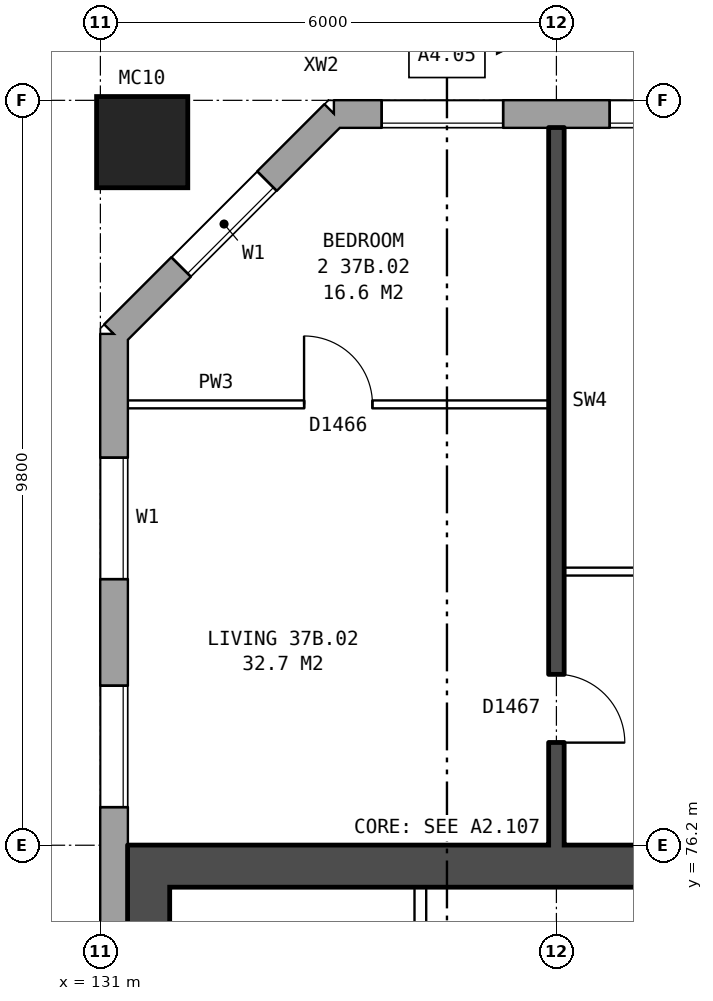
"""IFC4 building model, lengths in metres.
Left out: names, types, materials, properties, quantities, classifications, styles, units other than length and angle.
Written with IfcOpenShell. Run it as: python <this file> out.ifc"""

import sys

from ifc_helpers import new_model, si_unit, direction, frame, frame_2d, origin, origin_2d, place, context, subcontext, project, spatial, rectangle, hollow_rectangle, extrude, element, fill, save


model = new_model("IFC4")
c1 = context("Model", 3, precision=1e-05, world=origin(), true_north=direction((0.0, 1.0)))
c2 = subcontext(c1, "Body", "Model", "MODEL_VIEW")
j1 = project(units=[si_unit("LENGTHUNIT", "METRE"), si_unit("PLANEANGLEUNIT", "RADIAN")], contexts=[c1])
p1 = place(None, origin())
s1 = spatial("IfcSite", under=j1, at=p1, CompositionType="ELEMENT")
p2 = place(p1, origin())
s2 = spatial("IfcBuilding", under=s1, at=p2, CompositionType="ELEMENT")
p3 = place(p2, frame((0.0, 0.0, 133.0)))
s3 = spatial("IfcBuildingStorey", under=s2, at=p3, CompositionType="ELEMENT", Elevation=133.0)
p4 = place(p3, frame((131.55, 85.45, 0.0), z_axis=(0.0, 0.0, 1.0), x_axis=(1.0, 0.0, 0.0)))
e1 = element("IfcColumn", 1, at=p4, inside=s3, PredefinedType="COLUMN", context=c2, shape_type="SweptSolid", body=[
    extrude(hollow_rectangle(XDim=1.2, YDim=1.2, WallThickness=0.065, at=origin_2d()), origin(), (0.0, 0.0, 1.0), 3.1),
])
p5 = place(p3, frame((169.675, 85.82, 0.0), z_axis=(0.0, 0.0, 1.0), x_axis=(-1.0, 0.0, 0.0)))
e2 = element("IfcWall", 2, at=p5, inside=s3, PredefinedType="STANDARD", context=c2, shape_type="SweptSolid", body=[
    extrude(rectangle(XDim=35.601, YDim=0.36, at=frame_2d((17.8, 0.0))), origin(), (0.0, 0.0, 1.0), 2.85),
])
p6 = place(p5, frame((0.375, 0.0, 0.8)))
e3 = element("IfcOpeningElement", 3, at=p6, cuts=e2, PredefinedType="OPENING", context=c2, shape_type="SweptSolid", body=[
    extrude(rectangle(XDim=1.6, YDim=1.8, at=frame_2d((0.8, 0.9))), frame((0.0, 0.19, 0.0), z_axis=(0.0, -1.0, 0.0), x_axis=(1.0, 0.0, 0.0)), (0.0, 0.0, 1.0), 0.38),
])
p7 = place(p5, frame((3.375, 0.0, 0.8)))
e4 = element("IfcOpeningElement", 4, at=p7, cuts=e2, PredefinedType="OPENING", context=c2, shape_type="SweptSolid", body=[
    extrude(rectangle(XDim=1.6, YDim=1.8, at=frame_2d((0.8, 0.9))), frame((0.0, 0.19, 0.0), z_axis=(0.0, -1.0, 0.0), x_axis=(1.0, 0.0, 0.0)), (0.0, 0.0, 1.0), 0.38),
])
p8 = place(p5, frame((6.375, 0.0, 0.8)))
e5 = element("IfcOpeningElement", 5, at=p8, cuts=e2, PredefinedType="OPENING", context=c2, shape_type="SweptSolid", body=[
    extrude(rectangle(XDim=1.6, YDim=1.8, at=frame_2d((0.8, 0.9))), frame((0.0, 0.19, 0.0), z_axis=(0.0, -1.0, 0.0), x_axis=(1.0, 0.0, 0.0)), (0.0, 0.0, 1.0), 0.38),
])
p9 = place(p5, frame((8.875, 0.0, 0.8)))
e6 = element("IfcOpeningElement", 6, at=p9, cuts=e2, PredefinedType="OPENING", context=c2, shape_type="SweptSolid", body=[
    extrude(rectangle(XDim=0.8, YDim=1.8, at=frame_2d((0.4, 0.9))), frame((0.0, 0.19, 0.0), z_axis=(0.0, -1.0, 0.0), x_axis=(1.0, 0.0, 0.0)), (0.0, 0.0, 1.0), 0.38),
])
p10 = place(p5, frame((12.375, 0.0, 0.8)))
e7 = element("IfcOpeningElement", 7, at=p10, cuts=e2, PredefinedType="OPENING", context=c2, shape_type="SweptSolid", body=[
    extrude(rectangle(XDim=1.6, YDim=1.8, at=frame_2d((0.8, 0.9))), frame((0.0, 0.19, 0.0), z_axis=(0.0, -1.0, 0.0), x_axis=(1.0, 0.0, 0.0)), (0.0, 0.0, 1.0), 0.38),
])
p11 = place(p5, frame((15.375, 0.0, 0.8)))
e8 = element("IfcOpeningElement", 8, at=p11, cuts=e2, PredefinedType="OPENING", context=c2, shape_type="SweptSolid", body=[
    extrude(rectangle(XDim=1.6, YDim=1.8, at=frame_2d((0.8, 0.9))), frame((0.0, 0.19, 0.0), z_axis=(0.0, -1.0, 0.0), x_axis=(1.0, 0.0, 0.0)), (0.0, 0.0, 1.0), 0.38),
])
p12 = place(p5, frame((18.375, 0.0, 0.8)))
e9 = element("IfcOpeningElement", 9, at=p12, cuts=e2, PredefinedType="OPENING", context=c2, shape_type="SweptSolid", body=[
    extrude(rectangle(XDim=1.6, YDim=1.8, at=frame_2d((0.8, 0.9))), frame((0.0, 0.19, 0.0), z_axis=(0.0, -1.0, 0.0), x_axis=(1.0, 0.0, 0.0)), (0.0, 0.0, 1.0), 0.38),
])
p13 = place(p5, frame((21.375, 0.0, 0.8)))
e10 = element("IfcOpeningElement", 10, at=p13, cuts=e2, PredefinedType="OPENING", context=c2, shape_type="SweptSolid", body=[
    extrude(rectangle(XDim=1.6, YDim=1.8, at=frame_2d((0.8, 0.9))), frame((0.0, 0.19, 0.0), z_axis=(0.0, -1.0, 0.0), x_axis=(1.0, 0.0, 0.0)), (0.0, 0.0, 1.0), 0.38),
])
p14 = place(p5, frame((23.825, 0.0, 0.15)))
e11 = element("IfcOpeningElement", 11, at=p14, cuts=e2, PredefinedType="OPENING", context=c2, shape_type="SweptSolid", body=[
    extrude(rectangle(XDim=0.6, YDim=0.9, at=frame_2d((0.3, 0.45))), frame((0.0, 0.19, 0.0), z_axis=(0.0, -1.0, 0.0), x_axis=(1.0, 0.0, 0.0)), (0.0, 0.0, 1.0), 0.38),
])
p15 = place(p5, frame((27.375, 0.0, 0.8)))
e12 = element("IfcOpeningElement", 12, at=p15, cuts=e2, PredefinedType="OPENING", context=c2, shape_type="SweptSolid", body=[
    extrude(rectangle(XDim=1.6, YDim=1.8, at=frame_2d((0.8, 0.9))), frame((0.0, 0.19, 0.0), z_axis=(0.0, -1.0, 0.0), x_axis=(1.0, 0.0, 0.0)), (0.0, 0.0, 1.0), 0.38),
])
p16 = place(p5, frame((30.375, 0.0, 0.8)))
e13 = element("IfcOpeningElement", 13, at=p16, cuts=e2, PredefinedType="OPENING", context=c2, shape_type="SweptSolid", body=[
    extrude(rectangle(XDim=1.6, YDim=1.8, at=frame_2d((0.8, 0.9))), frame((0.0, 0.19, 0.0), z_axis=(0.0, -1.0, 0.0), x_axis=(1.0, 0.0, 0.0)), (0.0, 0.0, 1.0), 0.38),
])
p17 = place(p5, frame((33.375, 0.0, 0.8)))
e14 = element("IfcOpeningElement", 14, at=p17, cuts=e2, PredefinedType="OPENING", context=c2, shape_type="SweptSolid", body=[
    extrude(rectangle(XDim=1.6, YDim=1.8, at=frame_2d((0.8, 0.9))), frame((0.0, 0.19, 0.0), z_axis=(0.0, -1.0, 0.0), x_axis=(1.0, 0.0, 0.0)), (0.0, 0.0, 1.0), 0.38),
])
p18 = place(p5, frame((9.975, 0.0, 1.7)))
e15 = element("IfcOpeningElement", 15, at=p18, cuts=e2, PredefinedType="OPENING", context=c2, shape_type="SweptSolid", body=[
    extrude(rectangle(XDim=0.6, YDim=0.9, at=frame_2d((0.3, 0.45))), frame((0.0, 0.19, 0.0), z_axis=(0.0, -1.0, 0.0), x_axis=(1.0, 0.0, 0.0)), (0.0, 0.0, 1.0), 0.38),
])
p19 = place(p5, frame((25.275, 0.0, 1.35)))
e16 = element("IfcOpeningElement", 16, at=p19, cuts=e2, PredefinedType="OPENING", context=c2, shape_type="SweptSolid", body=[
    extrude(rectangle(XDim=1.2, YDim=1.2, at=frame_2d((0.6, 0.6))), frame((0.0, 0.19, 0.0), z_axis=(0.0, -1.0, 0.0), x_axis=(1.0, 0.0, 0.0)), (0.0, 0.0, 1.0), 0.38),
])
p20 = place(p3, frame((134.075, 85.82, 0.0), z_axis=(0.0, 0.0, 1.0), x_axis=(-0.707106781187, -0.707106781187, 0.0)))
e17 = element("IfcWall", 17, at=p20, inside=s3, PredefinedType="STANDARD", context=c2, shape_type="SweptSolid", body=[
    extrude(rectangle(XDim=4.094, YDim=0.36, at=frame_2d((2.047, 0.0))), origin(), (0.0, 0.0, 1.0), 2.85),
])
p21 = place(p20, frame((1.247, 0.0, 0.8)))
e18 = element("IfcOpeningElement", 18, at=p21, cuts=e17, PredefinedType="OPENING", context=c2, shape_type="SweptSolid", body=[
    extrude(rectangle(XDim=1.6, YDim=1.8, at=frame_2d((0.8, 0.9))), frame((0.0, 0.19, 0.0), z_axis=(0.0, -1.0, 0.0), x_axis=(1.0, 0.0, 0.0)), (0.0, 0.0, 1.0), 0.38),
])
p22 = place(p3, frame((131.18, 82.925, 0.0), z_axis=(0.0, 0.0, 1.0), x_axis=(0.0, -1.0, 0.0)))
e19 = element("IfcWall", 19, at=p22, inside=s3, PredefinedType="STANDARD", context=c2, shape_type="SweptSolid", body=[
    extrude(rectangle(XDim=25.851, YDim=0.36, at=frame_2d((12.925, 0.0))), origin(), (0.0, 0.0, 1.0), 2.85),
])
p23 = place(p22, frame((1.625, 0.0, 0.8)))
e20 = element("IfcOpeningElement", 20, at=p23, cuts=e19, PredefinedType="OPENING", context=c2, shape_type="SweptSolid", body=[
    extrude(rectangle(XDim=1.6, YDim=1.8, at=frame_2d((0.8, 0.9))), frame((0.0, 0.19, 0.0), z_axis=(0.0, -1.0, 0.0), x_axis=(1.0, 0.0, 0.0)), (0.0, 0.0, 1.0), 0.38),
])
p24 = place(p22, frame((4.625, 0.0, 0.8)))
e21 = element("IfcOpeningElement", 21, at=p24, cuts=e19, PredefinedType="OPENING", context=c2, shape_type="SweptSolid", body=[
    extrude(rectangle(XDim=1.6, YDim=1.8, at=frame_2d((0.8, 0.9))), frame((0.0, 0.19, 0.0), z_axis=(0.0, -1.0, 0.0), x_axis=(1.0, 0.0, 0.0)), (0.0, 0.0, 1.0), 0.38),
])
p25 = place(p22, frame((19.625, 0.0, 0.8)))
e22 = element("IfcOpeningElement", 22, at=p25, cuts=e19, PredefinedType="OPENING", context=c2, shape_type="SweptSolid", body=[
    extrude(rectangle(XDim=1.6, YDim=1.8, at=frame_2d((0.8, 0.9))), frame((0.0, 0.19, 0.0), z_axis=(0.0, -1.0, 0.0), x_axis=(1.0, 0.0, 0.0)), (0.0, 0.0, 1.0), 0.38),
])
p26 = place(p22, frame((22.625, 0.0, 0.8)))
e23 = element("IfcOpeningElement", 23, at=p26, cuts=e19, PredefinedType="OPENING", context=c2, shape_type="SweptSolid", body=[
    extrude(rectangle(XDim=1.6, YDim=1.8, at=frame_2d((0.8, 0.9))), frame((0.0, 0.19, 0.0), z_axis=(0.0, -1.0, 0.0), x_axis=(1.0, 0.0, 0.0)), (0.0, 0.0, 1.0), 0.38),
])
p27 = place(p3, frame((131.635, 63.8, 0.0), z_axis=(0.0, 0.0, 1.0), x_axis=(0.0, 1.0, 0.0)))
e24 = element("IfcWall", 24, at=p27, inside=s3, PredefinedType="SHEAR", context=c2, shape_type="SweptSolid", body=[
    extrude(rectangle(XDim=12.4, YDim=0.55, at=frame_2d((6.2, 0.0))), origin(), (0.0, 0.0, 1.0), 2.85),
])
p28 = place(p3, frame((139.21, 75.925, 0.0), z_axis=(0.0, 0.0, 1.0), x_axis=(-1.0, 0.0, 0.0)))
e25 = element("IfcWall", 25, at=p28, inside=s3, PredefinedType="SHEAR", context=c2, shape_type="SweptSolid", body=[
    extrude(rectangle(XDim=7.3, YDim=0.55, at=frame_2d((3.65, 0.0))), origin(), (0.0, 0.0, 1.0), 2.85),
])
p29 = place(p3, frame((135.21, 71.375, 0.0), z_axis=(0.0, 0.0, 1.0), x_axis=(0.0, 1.0, 0.0)))
e26 = element("IfcWall", 26, at=p29, inside=s3, PredefinedType="PARTITIONING", context=c2, shape_type="SweptSolid", body=[
    extrude(rectangle(XDim=4.275, YDim=0.15, at=frame_2d((2.137, 0.0))), origin(), (0.0, 0.0, 1.0), 2.85),
])
p30 = place(p29, frame((2.625, 0.0, 0.0)))
e27 = element("IfcOpeningElement", 27, at=p30, cuts=e26, PredefinedType="OPENING", context=c2, shape_type="SweptSolid", body=[
    extrude(rectangle(XDim=1.1, YDim=2.1, at=frame_2d((0.55, 1.05))), frame((0.0, 0.085, 0.0), z_axis=(0.0, -1.0, 0.0), x_axis=(1.0, 0.0, 0.0)), (0.0, 0.0, 1.0), 0.17),
])
p31 = place(p3, frame((137.1, 79.8, 0.0), z_axis=(0.0, 0.0, 1.0), x_axis=(1.0, 0.0, 0.0)))
e28 = element("IfcWall", 28, at=p31, inside=s3, PredefinedType="PARTITIONING", context=c2, shape_type="SweptSolid", body=[
    extrude(rectangle(XDim=5.8, YDim=0.1, at=frame_2d((2.9, 0.0))), origin(), (0.0, 0.0, 1.0), 2.85),
])
p32 = place(p31, frame((1.3, 0.0, 0.0)))
e29 = element("IfcOpeningElement", 29, at=p32, cuts=e28, PredefinedType="OPENING", context=c2, shape_type="SweptSolid", body=[
    extrude(rectangle(XDim=0.9, YDim=2.1, at=frame_2d((0.45, 1.05))), frame((0.0, 0.06, 0.0), z_axis=(0.0, -1.0, 0.0), x_axis=(1.0, 0.0, 0.0)), (0.0, 0.0, 1.0), 0.12),
])
p33 = place(p31, frame((4.2, 0.0, 0.0)))
e30 = element("IfcOpeningElement", 30, at=p33, cuts=e28, PredefinedType="OPENING", context=c2, shape_type="SweptSolid", body=[
    extrude(rectangle(XDim=0.9, YDim=2.1, at=frame_2d((0.45, 1.05))), frame((0.0, 0.06, 0.0), z_axis=(0.0, -1.0, 0.0), x_axis=(1.0, 0.0, 0.0)), (0.0, 0.0, 1.0), 0.12),
])
p34 = place(p3, frame((131.36, 82.0, 0.0), z_axis=(0.0, 0.0, 1.0), x_axis=(1.0, 0.0, 0.0)))
e31 = element("IfcWall", 31, at=p34, inside=s3, PredefinedType="PARTITIONING", context=c2, shape_type="SweptSolid", body=[
    extrude(rectangle(XDim=5.54, YDim=0.1, at=frame_2d((2.77, 0.0))), origin(), (0.0, 0.0, 1.0), 2.85),
])
p35 = place(p34, frame((2.32, 0.0, 0.0)))
e32 = element("IfcOpeningElement", 32, at=p35, cuts=e31, PredefinedType="OPENING", context=c2, shape_type="SweptSolid", body=[
    extrude(rectangle(XDim=0.9, YDim=2.1, at=frame_2d((0.45, 1.05))), frame((0.0, 0.06, 0.0), z_axis=(0.0, -1.0, 0.0), x_axis=(1.0, 0.0, 0.0)), (0.0, 0.0, 1.0), 0.12),
])
p36 = place(p3, frame((137.0, 76.2, 0.0), z_axis=(0.0, 0.0, 1.0), x_axis=(0.0, 1.0, 0.0)))
e33 = element("IfcWall", 33, at=p36, inside=s3, PredefinedType="SOLIDWALL", context=c2, shape_type="SweptSolid", body=[
    extrude(rectangle(XDim=9.44, YDim=0.2, at=frame_2d((4.72, 0.0))), origin(), (0.0, 0.0, 1.0), 2.85),
])
p37 = place(p36, frame((1.35, 0.0, 0.0)))
e34 = element("IfcOpeningElement", 34, at=p37, cuts=e33, PredefinedType="OPENING", context=c2, shape_type="SweptSolid", body=[
    extrude(rectangle(XDim=0.9, YDim=2.1, at=frame_2d((0.45, 1.05))), frame((0.0, 0.11, 0.0), z_axis=(0.0, -1.0, 0.0), x_axis=(1.0, 0.0, 0.0)), (0.0, 0.0, 1.0), 0.22),
])
p38 = place(p16, origin())
e35 = element("IfcWindow", 35, at=p38, inside=s3, PartitioningType="SINGLE_PANEL", PredefinedType="WINDOW", context=c2, shape_type="SweptSolid", body=[
    extrude(rectangle(XDim=1.6, YDim=1.8, at=frame_2d((0.8, 0.9))), frame((0.0, 0.15, 0.0), z_axis=(0.0, -1.0, 0.0), x_axis=(1.0, 0.0, 0.0)), (0.0, 0.0, 1.0), 0.06),
])
fill(e13, e35)
p39 = place(p17, origin())
e36 = element("IfcWindow", 36, at=p39, inside=s3, PartitioningType="SINGLE_PANEL", PredefinedType="WINDOW", context=c2, shape_type="SweptSolid", body=[
    extrude(rectangle(XDim=1.6, YDim=1.8, at=frame_2d((0.8, 0.9))), frame((0.0, 0.15, 0.0), z_axis=(0.0, -1.0, 0.0), x_axis=(1.0, 0.0, 0.0)), (0.0, 0.0, 1.0), 0.06),
])
fill(e14, e36)
p40 = place(p21, origin())
e37 = element("IfcWindow", 37, at=p40, inside=s3, PartitioningType="SINGLE_PANEL", PredefinedType="WINDOW", context=c2, shape_type="SweptSolid", body=[
    extrude(rectangle(XDim=1.6, YDim=1.8, at=frame_2d((0.8, 0.9))), frame((0.0, 0.15, 0.0), z_axis=(0.0, -1.0, 0.0), x_axis=(1.0, 0.0, 0.0)), (0.0, 0.0, 1.0), 0.06),
])
fill(e18, e37)
p41 = place(p23, origin())
e38 = element("IfcWindow", 38, at=p41, inside=s3, PartitioningType="SINGLE_PANEL", PredefinedType="WINDOW", context=c2, shape_type="SweptSolid", body=[
    extrude(rectangle(XDim=1.6, YDim=1.8, at=frame_2d((0.8, 0.9))), frame((0.0, 0.15, 0.0), z_axis=(0.0, -1.0, 0.0), x_axis=(1.0, 0.0, 0.0)), (0.0, 0.0, 1.0), 0.06),
])
fill(e20, e38)
p42 = place(p24, origin())
e39 = element("IfcWindow", 39, at=p42, inside=s3, PartitioningType="SINGLE_PANEL", PredefinedType="WINDOW", context=c2, shape_type="SweptSolid", body=[
    extrude(rectangle(XDim=1.6, YDim=1.8, at=frame_2d((0.8, 0.9))), frame((0.0, 0.15, 0.0), z_axis=(0.0, -1.0, 0.0), x_axis=(1.0, 0.0, 0.0)), (0.0, 0.0, 1.0), 0.06),
])
fill(e21, e39)
p43 = place(p35, origin())
e40 = element("IfcDoor", 40, at=p43, inside=s3, OperationType="SINGLE_SWING_LEFT", PredefinedType="DOOR", context=c2, shape_type="SweptSolid", body=[
    extrude(rectangle(XDim=0.9, YDim=2.1, at=frame_2d((0.45, 1.05))), frame((0.0, 0.025, 0.0), z_axis=(0.0, -1.0, 0.0), x_axis=(1.0, 0.0, 0.0)), (0.0, 0.0, 1.0), 0.05),
])
fill(e32, e40)
p44 = place(p37, frame((0.9, 0.0, 0.0), z_axis=(0.0, 0.0, 1.0), x_axis=(-1.0, 0.0, 0.0)))
e41 = element("IfcDoor", 41, at=p44, inside=s3, OperationType="SINGLE_SWING_RIGHT", PredefinedType="DOOR", context=c2, shape_type="SweptSolid", body=[
    extrude(rectangle(XDim=0.9, YDim=2.1, at=frame_2d((0.45, 1.05))), frame((0.0, 0.025, 0.0), z_axis=(0.0, -1.0, 0.0), x_axis=(1.0, 0.0, 0.0)), (0.0, 0.0, 1.0), 0.05),
])
fill(e34, e41)
save(model, sys.argv[1])
